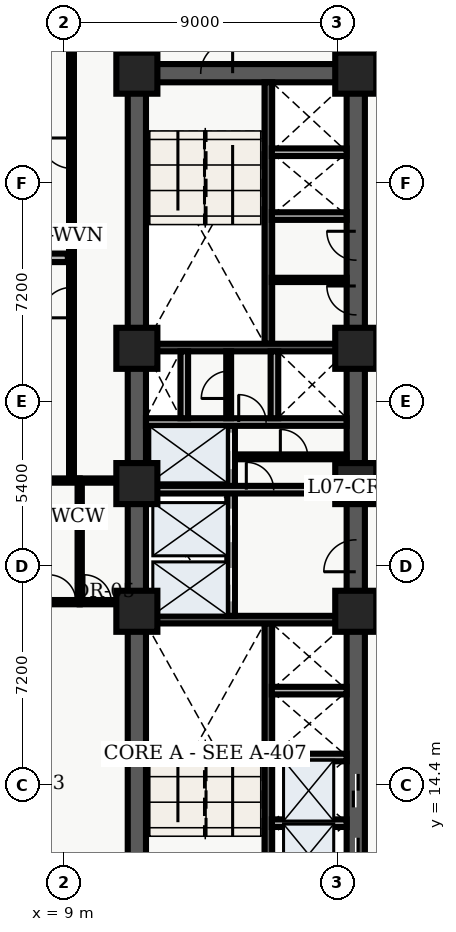
"""IFC4 building model, lengths in metres.
Left out: names, types, materials, properties, quantities, classifications, styles, units other than length and angle.
Written with IfcOpenShell. Run it as: python <this file> out.ifc"""

import sys

from ifc_helpers import new_model, entity, si_unit, converted_unit, direction, frame, origin_with_axes, origin_2d_with_axis, place, context, subcontext, project, spatial, polyline, rectangle, outline, extrude, element, fill, save


model = new_model("IFC4")
c1 = context("Model", 3, precision=1e-05, world=origin_with_axes(), true_north=direction((0.0, 1.0)))
c2 = subcontext(c1, "Body", "Model", "MODEL_VIEW")
j1 = project(units=[si_unit("LENGTHUNIT", "METRE"), converted_unit("PLANEANGLEUNIT", "DEGREE", entity("IfcPlaneAngleMeasure", 0.017), si_unit("PLANEANGLEUNIT", "RADIAN"), dimensions=[0, 0, 0, 0, 0, 0, 0])], contexts=[c1])
p1 = place(None, origin_with_axes())
s1 = spatial("IfcSite", under=j1, at=p1, CompositionType="ELEMENT")
p2 = place(p1, origin_with_axes())
s2 = spatial("IfcBuilding", under=s1, at=p2, CompositionType="ELEMENT")
p3 = place(p2, frame((0.0, 0.0, 32.7), z_axis=(0.0, 0.0, 1.0), x_axis=(1.0, 0.0, 0.0)))
s3 = spatial("IfcBuildingStorey", under=s2, at=p3, CompositionType="ELEMENT", Elevation=32.7)
p4 = place(p3, frame((11.4, 10.8, 0.0), z_axis=(0.0, 0.0, 1.0), x_axis=(0.0, 1.0, 0.0)))
e1 = element("IfcWall", 1, at=p4, inside=s3, PredefinedType="SHEAR", context=c2, shape_type="SweptSolid", body=[
    extrude(outline(polyline([(0.0, -0.3), (27.0, -0.3), (27.0, 0.3), (0.0, 0.3), (0.0, -0.3)])), origin_with_axes(), (0.0, 0.0, 1.0), 3.66),
])
p5 = place(p3, frame((11.4, 37.8, 0.0), z_axis=(0.0, 0.0, 1.0), x_axis=(1.0, 0.0, 0.0)))
e2 = element("IfcWall", 2, at=p5, inside=s3, PredefinedType="SHEAR", context=c2, shape_type="SweptSolid", body=[
    extrude(outline(polyline([(0.0, -0.3), (7.2, -0.3), (7.2, 0.3), (0.0, 0.3), (0.0, -0.3)])), origin_with_axes(), (0.0, 0.0, 1.0), 3.66),
])
p6 = place(p5, frame((2.625, 0.0, 0.0), z_axis=(0.0, 0.0, 1.0), x_axis=(1.0, 0.0, 0.0)))
e3 = element("IfcOpeningElement", 3, at=p6, cuts=e2, PredefinedType="OPENING", context=c2, shape_type="SweptSolid", body=[
    extrude(rectangle(XDim=1.05, YDim=0.62, at=origin_2d_with_axis()), origin_with_axes(), (0.0, 0.0, 1.0), 2.15),
])
p7 = place(p3, frame((18.6, 10.8, 0.0), z_axis=(0.0, 0.0, 1.0), x_axis=(0.0, 1.0, 0.0)))
e4 = element("IfcWall", 4, at=p7, inside=s3, PredefinedType="SHEAR", context=c2, shape_type="SweptSolid", body=[
    extrude(outline(polyline([(0.0, -0.3), (13.5, -0.3), (13.5, 0.3), (0.0, 0.3), (0.0, -0.3)])), origin_with_axes(), (0.0, 0.0, 1.0), 3.66),
])
p8 = place(p7, frame((1.3, 0.0, 0.0), z_axis=(0.0, 0.0, 1.0), x_axis=(1.0, 0.0, 0.0)))
e5 = element("IfcOpeningElement", 5, at=p8, cuts=e4, PredefinedType="OPENING", context=c2, shape_type="SweptSolid", body=[
    extrude(rectangle(XDim=1.1, YDim=0.62, at=origin_2d_with_axis()), origin_with_axes(), (0.0, 0.0, 1.0), 2.15),
])
p9 = place(p7, frame((3.4, 0.0, 0.0), z_axis=(0.0, 0.0, 1.0), x_axis=(1.0, 0.0, 0.0)))
e6 = element("IfcOpeningElement", 6, at=p9, cuts=e4, PredefinedType="OPENING", context=c2, shape_type="SweptSolid", body=[
    extrude(rectangle(XDim=1.1, YDim=0.62, at=origin_2d_with_axis()), origin_with_axes(), (0.0, 0.0, 1.0), 2.15),
])
p10 = place(p7, frame((11.125, 0.0, 0.0), z_axis=(0.0, 0.0, 1.0), x_axis=(1.0, 0.0, 0.0)))
e7 = element("IfcOpeningElement", 7, at=p10, cuts=e4, PredefinedType="OPENING", context=c2, shape_type="SweptSolid", body=[
    extrude(rectangle(XDim=1.05, YDim=0.62, at=origin_2d_with_axis()), origin_with_axes(), (0.0, 0.0, 1.0), 2.15),
])
p11 = place(p3, frame((18.6, 24.3, 0.0), z_axis=(0.0, 0.0, 1.0), x_axis=(0.0, 1.0, 0.0)))
e8 = element("IfcWall", 8, at=p11, inside=s3, PredefinedType="SHEAR", context=c2, shape_type="SweptSolid", body=[
    extrude(outline(polyline([(0.0, -0.3), (13.5, -0.3), (13.5, 0.3), (0.0, 0.3), (0.0, -0.3)])), origin_with_axes(), (0.0, 0.0, 1.0), 3.66),
])
p12 = place(p11, frame((6.025, 0.0, 0.0), z_axis=(0.0, 0.0, 1.0), x_axis=(1.0, 0.0, 0.0)))
e9 = element("IfcOpeningElement", 9, at=p12, cuts=e8, PredefinedType="OPENING", context=c2, shape_type="SweptSolid", body=[
    extrude(rectangle(XDim=0.95, YDim=0.62, at=origin_2d_with_axis()), origin_with_axes(), (0.0, 0.0, 1.0), 2.15),
])
p13 = place(p11, frame((7.825, 0.0, 0.0), z_axis=(0.0, 0.0, 1.0), x_axis=(1.0, 0.0, 0.0)))
e10 = element("IfcOpeningElement", 10, at=p13, cuts=e8, PredefinedType="OPENING", context=c2, shape_type="SweptSolid", body=[
    extrude(rectangle(XDim=0.95, YDim=0.62, at=origin_2d_with_axis()), origin_with_axes(), (0.0, 0.0, 1.0), 2.15),
])
p14 = place(p3, frame((15.725, 11.1, 0.0), z_axis=(0.0, 0.0, 1.0), x_axis=(0.0, 1.0, 0.0)))
e11 = element("IfcWall", 11, at=p14, inside=s3, PredefinedType="SHEAR", context=c2, shape_type="SweptSolid", body=[
    extrude(outline(polyline([(0.0, -0.125), (8.6, -0.125), (8.6, 0.125), (0.0, 0.125), (0.0, -0.125)])), origin_with_axes(), (0.0, 0.0, 1.0), 3.66),
])
p15 = place(p3, frame((11.7, 19.825, 0.0), z_axis=(0.0, 0.0, 1.0), x_axis=(1.0, 0.0, 0.0)))
e12 = element("IfcWall", 12, at=p15, inside=s3, PredefinedType="SHEAR", context=c2, shape_type="SweptSolid", body=[
    extrude(outline(polyline([(0.0, -0.125), (6.6, -0.125), (6.6, 0.125), (0.0, 0.125), (0.0, -0.125)])), origin_with_axes(), (0.0, 0.0, 1.0), 3.66),
])
p16 = place(p3, frame((15.725, 28.9, 0.0), z_axis=(0.0, 0.0, 1.0), x_axis=(0.0, 1.0, 0.0)))
e13 = element("IfcWall", 13, at=p16, inside=s3, PredefinedType="SHEAR", context=c2, shape_type="SweptSolid", body=[
    extrude(outline(polyline([(0.0, -0.125), (8.6, -0.125), (8.6, 0.125), (0.0, 0.125), (0.0, -0.125)])), origin_with_axes(), (0.0, 0.0, 1.0), 3.66),
])
p17 = place(p3, frame((11.7, 28.775, 0.0), z_axis=(0.0, 0.0, 1.0), x_axis=(1.0, 0.0, 0.0)))
e14 = element("IfcWall", 14, at=p17, inside=s3, PredefinedType="SHEAR", context=c2, shape_type="SweptSolid", body=[
    extrude(outline(polyline([(0.0, -0.125), (6.6, -0.125), (6.6, 0.125), (0.0, 0.125), (0.0, -0.125)])), origin_with_axes(), (0.0, 0.0, 1.0), 3.66),
])
p18 = place(p3, frame((14.5, 19.95, 0.0), z_axis=(0.0, 0.0, 1.0), x_axis=(0.0, 1.0, 0.0)))
e15 = element("IfcWall", 15, at=p18, inside=s3, PredefinedType="SOLIDWALL", context=c2, shape_type="SweptSolid", body=[
    extrude(outline(polyline([(0.0, -0.125), (6.25, -0.125), (6.25, 0.125), (0.0, 0.125), (0.0, -0.125)])), origin_with_axes(), (0.0, 0.0, 1.0), 2.7),
])
p19 = place(p18, frame((1.025, 0.0, 0.0), z_axis=(0.0, 0.0, 1.0), x_axis=(1.0, 0.0, 0.0)))
e16 = element("IfcOpeningElement", 16, at=p19, cuts=e15, PredefinedType="OPENING", context=c2, shape_type="SweptSolid", body=[
    extrude(rectangle(XDim=1.1, YDim=0.27, at=origin_2d_with_axis()), origin_with_axes(), (0.0, 0.0, 1.0), 2.15),
])
p20 = place(p18, frame((2.975, 0.0, 0.0), z_axis=(0.0, 0.0, 1.0), x_axis=(1.0, 0.0, 0.0)))
e17 = element("IfcOpeningElement", 17, at=p20, cuts=e15, PredefinedType="OPENING", context=c2, shape_type="SweptSolid", body=[
    extrude(rectangle(XDim=1.1, YDim=0.27, at=origin_2d_with_axis()), origin_with_axes(), (0.0, 0.0, 1.0), 2.15),
])
p21 = place(p18, frame((5.425, 0.0, 0.0), z_axis=(0.0, 0.0, 1.0), x_axis=(1.0, 0.0, 0.0)))
e18 = element("IfcOpeningElement", 18, at=p21, cuts=e15, PredefinedType="OPENING", context=c2, shape_type="SweptSolid", body=[
    extrude(rectangle(XDim=1.2, YDim=0.27, at=origin_2d_with_axis()), origin_with_axes(), (0.0, 0.0, 1.0), 2.15),
])
p22 = place(p3, frame((11.7, 24.1, 0.0), z_axis=(0.0, 0.0, 1.0), x_axis=(1.0, 0.0, 0.0)))
e19 = element("IfcWall", 19, at=p22, inside=s3, PredefinedType="SOLIDWALL", context=c2, shape_type="SweptSolid", body=[
    extrude(outline(polyline([(0.0, -0.125), (6.6, -0.125), (6.6, 0.125), (0.0, 0.125), (0.0, -0.125)])), origin_with_axes(), (0.0, 0.0, 1.0), 2.7),
])
p23 = place(p22, frame((3.75, 0.0, 0.0), z_axis=(0.0, 0.0, 1.0), x_axis=(1.0, 0.0, 0.0)))
e20 = element("IfcOpeningElement", 20, at=p23, cuts=e19, PredefinedType="OPENING", context=c2, shape_type="SweptSolid", body=[
    extrude(rectangle(XDim=0.9, YDim=0.27, at=origin_2d_with_axis()), origin_with_axes(), (0.0, 0.0, 1.0), 2.15),
])
p24 = place(p3, frame((11.7, 26.325, 0.0), z_axis=(0.0, 0.0, 1.0), x_axis=(1.0, 0.0, 0.0)))
e21 = element("IfcWall", 21, at=p24, inside=s3, PredefinedType="SOLIDWALL", context=c2, shape_type="SweptSolid", body=[
    extrude(outline(polyline([(0.0, -0.125), (6.6, -0.125), (6.6, 0.125), (0.0, 0.125), (0.0, -0.125)])), origin_with_axes(), (0.0, 0.0, 1.0), 2.7),
])
p25 = place(p24, frame((3.5, 0.0, 0.0), z_axis=(0.0, 0.0, 1.0), x_axis=(1.0, 0.0, 0.0)))
e22 = element("IfcOpeningElement", 22, at=p25, cuts=e21, PredefinedType="OPENING", context=c2, shape_type="SweptSolid", body=[
    extrude(rectangle(XDim=0.9, YDim=0.27, at=origin_2d_with_axis()), origin_with_axes(), (0.0, 0.0, 1.0), 2.15),
])
for number, where, z_axis, x_axis in (
    (23, (12.96, 26.45, 0.0), (0.0, 0.0, 1.0), (0.0, 1.0, 0.0)),
    (24, (15.925, 26.45, 0.0), (0.0, 0.0, 1.0), (0.0, 1.0, 0.0)),
):
    element("IfcWall", number, at=place(p3, frame(where, z_axis=z_axis, x_axis=x_axis)), inside=s3, PredefinedType="SOLIDWALL", context=c2, shape_type="SweptSolid", body=[
        extrude(outline(polyline([(0.0, -0.125), (2.2, -0.125), (2.2, 0.125), (0.0, 0.125), (0.0, -0.125)])), origin_with_axes(), (0.0, 0.0, 1.0), 2.7),
    ])
for number, where, z_axis, x_axis in (
    (25, (11.4, 20.1, 0.0), (0.0, 0.0, 1.0), (1.0, 0.0, 0.0)),
    (26, (11.4, 24.3, 0.0), (0.0, 0.0, 1.0), (1.0, 0.0, 0.0)),
    (27, (11.4, 28.75, 0.0), (0.0, 0.0, 1.0), (1.0, 0.0, 0.0)),
    (28, (11.4, 37.8, 0.0), (0.0, 0.0, 1.0), (1.0, 0.0, 0.0)),
    (29, (18.6, 20.1, 0.0), (0.0, 0.0, 1.0), (1.0, 0.0, 0.0)),
    (30, (18.6, 24.3, 0.0), (0.0, 0.0, 1.0), (1.0, 0.0, 0.0)),
    (31, (18.6, 28.75, 0.0), (0.0, 0.0, 1.0), (1.0, 0.0, 0.0)),
    (32, (18.6, 37.8, 0.0), (0.0, 0.0, 1.0), (1.0, 0.0, 0.0)),
):
    element("IfcColumn", number, at=place(p3, frame(where, z_axis=z_axis, x_axis=x_axis)), inside=s3, PredefinedType="COLUMN", context=c2, shape_type="SweptSolid", body=[
        extrude(rectangle(XDim=1.35, YDim=1.35, at=origin_2d_with_axis()), origin_with_axes(), (0.0, 0.0, 1.0), 3.9),
    ])
p26 = place(p3, frame((14.62, 25.18, 0.0), z_axis=(0.0, 0.0, 1.0), x_axis=(1.0, 0.0, 0.0)))
e33 = element("IfcWall", 33, at=p26, inside=s3, PredefinedType="PARTITIONING", context=c2, shape_type="SweptSolid", body=[
    extrude(outline(polyline([(0.0, -0.08), (3.68, -0.08), (3.68, 0.08), (0.0, 0.08), (0.0, -0.08)])), origin_with_axes(), (0.0, 0.0, 1.0), 2.7),
])
p27 = place(p26, frame((1.95, 0.0, 0.0), z_axis=(0.0, 0.0, 1.0), x_axis=(1.0, 0.0, 0.0)))
e34 = element("IfcOpeningElement", 34, at=p27, cuts=e33, PredefinedType="OPENING", context=c2, shape_type="SweptSolid", body=[
    extrude(rectangle(XDim=0.9, YDim=0.18, at=origin_2d_with_axis()), origin_with_axes(), (0.0, 0.0, 1.0), 2.15),
])
p28 = place(p3, frame((14.42, 26.45, 0.0), z_axis=(0.0, 0.0, 1.0), x_axis=(0.0, 1.0, 0.0)))
e35 = element("IfcWall", 35, at=p28, inside=s3, PredefinedType="PARTITIONING", context=c2, shape_type="SweptSolid", body=[
    extrude(outline(polyline([(0.0, -0.08), (2.2, -0.08), (2.2, 0.08), (0.0, 0.08), (0.0, -0.08)])), origin_with_axes(), (0.0, 0.0, 1.0), 2.7),
])
p29 = place(p28, frame((1.1, 0.0, 0.0), z_axis=(0.0, 0.0, 1.0), x_axis=(1.0, 0.0, 0.0)))
e36 = element("IfcOpeningElement", 36, at=p29, cuts=e35, PredefinedType="OPENING", context=c2, shape_type="SweptSolid", body=[
    extrude(rectangle(XDim=0.9, YDim=0.18, at=origin_2d_with_axis()), origin_with_axes(), (0.0, 0.0, 1.0), 2.15),
])
for number, where, z_axis, x_axis in (
    (37, (15.84, 13.13, 0.0), (0.0, 0.0, 1.0), (1.0, 0.0, 0.0)),
    (38, (15.84, 15.29, 0.0), (0.0, 0.0, 1.0), (1.0, 0.0, 0.0)),
    (39, (15.84, 17.49, 0.0), (0.0, 0.0, 1.0), (1.0, 0.0, 0.0)),
    (40, (15.84, 33.1, 0.0), (0.0, 0.0, 1.0), (1.0, 0.0, 0.0)),
    (41, (15.84, 35.2, 0.0), (0.0, 0.0, 1.0), (1.0, 0.0, 0.0)),
):
    element("IfcWall", number, at=place(p3, frame(where, z_axis=z_axis, x_axis=x_axis)), inside=s3, PredefinedType="SOLIDWALL", context=c2, shape_type="SweptSolid", body=[
        extrude(outline(polyline([(0.0, -0.125), (2.46, -0.125), (2.46, 0.125), (0.0, 0.125), (0.0, -0.125)])), origin_with_axes(), (0.0, 0.0, 1.0), 2.7),
    ])
p30 = place(p3, frame((15.84, 31.0, 0.0), z_axis=(0.0, 0.0, 1.0), x_axis=(1.0, 0.0, 0.0)))
e42 = element("IfcWall", 42, at=p30, inside=s3, PredefinedType="PARTITIONING", context=c2, shape_type="SweptSolid", body=[
    extrude(outline(polyline([(0.0, -0.07), (2.46, -0.07), (2.46, 0.07), (0.0, 0.07), (0.0, -0.07)])), origin_with_axes(), (0.0, 0.0, 1.0), 2.7),
])
p31 = place(p3, frame((9.52, 20.4, 0.0), z_axis=(0.0, 0.0, 1.0), x_axis=(0.0, 1.0, 0.0)))
e43 = element("IfcWall", 43, at=p31, inside=s3, PredefinedType="PARTITIONING", context=c2, shape_type="SweptSolid", body=[
    extrude(outline(polyline([(0.0, -0.07), (4.0, -0.07), (4.0, 0.07), (0.0, 0.07), (0.0, -0.07)])), origin_with_axes(), (0.0, 0.0, 1.0), 2.7),
])
p32 = place(p3, frame((9.52, 20.4, 0.0), z_axis=(0.0, 0.0, 1.0), x_axis=(1.0, 0.0, 0.0)))
e44 = element("IfcWall", 44, at=p32, inside=s3, PredefinedType="PARTITIONING", context=c2, shape_type="SweptSolid", body=[
    extrude(outline(polyline([(0.0, -0.07), (1.58, -0.07), (1.58, 0.07), (0.0, 0.07), (0.0, -0.07)])), origin_with_axes(), (0.0, 0.0, 1.0), 2.7),
])
p33 = place(p32, frame((0.59, 0.0, 0.0), z_axis=(0.0, 0.0, 1.0), x_axis=(1.0, 0.0, 0.0)))
e45 = element("IfcOpeningElement", 45, at=p33, cuts=e44, PredefinedType="OPENING", context=c2, shape_type="SweptSolid", body=[
    extrude(rectangle(XDim=0.9, YDim=0.16, at=origin_2d_with_axis()), origin_with_axes(), (0.0, 0.0, 1.0), 2.15),
])
p34 = place(p3, frame((9.52, 24.4, 0.0), z_axis=(0.0, 0.0, 1.0), x_axis=(1.0, 0.0, 0.0)))
e46 = element("IfcWall", 46, at=p34, inside=s3, PredefinedType="PARTITIONING", context=c2, shape_type="SweptSolid", body=[
    extrude(outline(polyline([(0.0, -0.07), (1.58, -0.07), (1.58, 0.07), (0.0, 0.07), (0.0, -0.07)])), origin_with_axes(), (0.0, 0.0, 1.0), 2.7),
])
p35 = place(p3, frame((9.25, 24.4, 0.0), z_axis=(0.0, 0.0, 1.0), x_axis=(0.0, 1.0, 0.0)))
e47 = element("IfcWall", 47, at=p35, inside=s3, PredefinedType="PARTITIONING", context=c2, shape_type="SweptSolid", body=[
    extrude(outline(polyline([(0.0, -0.08), (16.1, -0.08), (16.1, 0.08), (0.0, 0.08), (0.0, -0.08)])), origin_with_axes(), (0.0, 0.0, 1.0), 2.7),
])
p36 = place(p35, frame((5.853, 0.0, 0.0), z_axis=(0.0, 0.0, 1.0), x_axis=(1.0, 0.0, 0.0)))
e48 = element("IfcOpeningElement", 48, at=p36, cuts=e47, PredefinedType="OPENING", context=c2, shape_type="SweptSolid", body=[
    extrude(rectangle(XDim=1.0, YDim=0.18, at=origin_2d_with_axis()), origin_with_axes(), (0.0, 0.0, 1.0), 2.15),
])
p37 = place(p35, frame((10.768, 0.0, 0.0), z_axis=(0.0, 0.0, 1.0), x_axis=(1.0, 0.0, 0.0)))
e49 = element("IfcOpeningElement", 49, at=p37, cuts=e47, PredefinedType="OPENING", context=c2, shape_type="SweptSolid", body=[
    extrude(rectangle(XDim=1.0, YDim=0.18, at=origin_2d_with_axis()), origin_with_axes(), (0.0, 0.0, 1.0), 2.15),
])
p38 = place(p3, frame((0.36, 20.4, 0.0), z_axis=(0.0, 0.0, 1.0), x_axis=(1.0, 0.0, 0.0)))
e50 = element("IfcWall", 50, at=p38, inside=s3, PredefinedType="PARTITIONING", context=c2, shape_type="SweptSolid", body=[
    extrude(outline(polyline([(0.0, -0.07), (9.16, -0.07), (9.16, 0.07), (0.0, 0.07), (0.0, -0.07)])), origin_with_axes(), (0.0, 0.0, 1.0), 2.7),
])
p39 = place(p38, frame((8.59, 0.0, 0.0), z_axis=(0.0, 0.0, 1.0), x_axis=(1.0, 0.0, 0.0)))
e51 = element("IfcOpeningElement", 51, at=p39, cuts=e50, PredefinedType="OPENING", context=c2, shape_type="SweptSolid", body=[
    extrude(rectangle(XDim=0.9, YDim=0.16, at=origin_2d_with_axis()), origin_with_axes(), (0.0, 0.0, 1.0), 2.15),
])
p40 = place(p3, frame((0.36, 24.4, 0.0), z_axis=(0.0, 0.0, 1.0), x_axis=(1.0, 0.0, 0.0)))
e52 = element("IfcWall", 52, at=p40, inside=s3, PredefinedType="PARTITIONING", context=c2, shape_type="SweptSolid", body=[
    extrude(outline(polyline([(0.0, -0.07), (9.16, -0.07), (9.16, 0.07), (0.0, 0.07), (0.0, -0.07)])), origin_with_axes(), (0.0, 0.0, 1.0), 2.7),
])
p41 = place(p3, frame((0.375, 31.726, 0.0), z_axis=(0.0, 0.0, 1.0), x_axis=(1.0, 0.0, 0.0)))
e53 = element("IfcWall", 53, at=p41, inside=s3, PredefinedType="PARTITIONING", context=c2, shape_type="SweptSolid", body=[
    extrude(outline(polyline([(0.0, -0.14), (8.755, -0.14), (8.755, 0.14), (0.0, 0.14), (0.0, -0.14)])), origin_with_axes(), (0.0, 0.0, 1.0), 2.7),
])
p42 = place(p7, frame((1.3, 0.0, 0.0), z_axis=(0.0, 0.0, 1.0), x_axis=(1.0, 0.0, 0.0)))
e54 = element("IfcDoor", 54, at=p42, inside=s3, OperationType="SLIDING_TO_LEFT", PredefinedType="DOOR", context=c2, shape_type="SweptSolid", body=[
    extrude(rectangle(XDim=1.1, YDim=0.09, at=origin_2d_with_axis()), origin_with_axes(), (0.0, 0.0, 1.0), 2.15),
])
fill(e5, e54)
p43 = place(p7, frame((3.4, 0.0, 0.0), z_axis=(0.0, 0.0, 1.0), x_axis=(1.0, 0.0, 0.0)))
e55 = element("IfcDoor", 55, at=p43, inside=s3, OperationType="SLIDING_TO_RIGHT", PredefinedType="DOOR", context=c2, shape_type="SweptSolid", body=[
    extrude(rectangle(XDim=1.1, YDim=0.09, at=origin_2d_with_axis()), origin_with_axes(), (0.0, 0.0, 1.0), 2.15),
])
fill(e6, e55)
p44 = place(p18, frame((1.025, 0.0, 0.0), z_axis=(0.0, 0.0, 1.0), x_axis=(1.0, 0.0, 0.0)))
e56 = element("IfcDoor", 56, at=p44, inside=s3, OperationType="SLIDING_TO_LEFT", PredefinedType="DOOR", context=c2, shape_type="SweptSolid", body=[
    extrude(rectangle(XDim=1.1, YDim=0.09, at=origin_2d_with_axis()), origin_with_axes(), (0.0, 0.0, 1.0), 2.15),
])
fill(e16, e56)
p45 = place(p18, frame((2.975, 0.0, 0.0), z_axis=(0.0, 0.0, 1.0), x_axis=(1.0, 0.0, 0.0)))
e57 = element("IfcDoor", 57, at=p45, inside=s3, OperationType="SLIDING_TO_RIGHT", PredefinedType="DOOR", context=c2, shape_type="SweptSolid", body=[
    extrude(rectangle(XDim=1.1, YDim=0.09, at=origin_2d_with_axis()), origin_with_axes(), (0.0, 0.0, 1.0), 2.15),
])
fill(e17, e57)
p46 = place(p18, frame((5.425, 0.0, 0.0), z_axis=(0.0, 0.0, 1.0), x_axis=(1.0, 0.0, 0.0)))
e58 = element("IfcDoor", 58, at=p46, inside=s3, OperationType="DOUBLE_DOOR_SLIDING", PredefinedType="DOOR", context=c2, shape_type="SweptSolid", body=[
    extrude(rectangle(XDim=1.2, YDim=0.09, at=origin_2d_with_axis()), origin_with_axes(), (0.0, 0.0, 1.0), 2.15),
])
fill(e18, e58)
p47 = place(p5, frame((2.625, 0.0, 0.0), z_axis=(0.0, 0.0, 1.0), x_axis=(1.0, 0.0, 0.0)))
e59 = element("IfcDoor", 59, at=p47, inside=s3, OperationType="SINGLE_SWING_RIGHT", PredefinedType="DOOR", context=c2, shape_type="SweptSolid", body=[
    extrude(rectangle(XDim=1.05, YDim=0.09, at=origin_2d_with_axis()), origin_with_axes(), (0.0, 0.0, 1.0), 2.15),
])
fill(e3, e59)
p48 = place(p7, frame((11.125, 0.0, 0.0), z_axis=(0.0, 0.0, 1.0), x_axis=(1.0, 0.0, 0.0)))
e60 = element("IfcDoor", 60, at=p48, inside=s3, OperationType="SINGLE_SWING_LEFT", PredefinedType="DOOR", context=c2, shape_type="SweptSolid", body=[
    extrude(rectangle(XDim=1.05, YDim=0.09, at=origin_2d_with_axis()), origin_with_axes(), (0.0, 0.0, 1.0), 2.15),
])
fill(e7, e60)
p49 = place(p24, frame((3.5, 0.0, 0.0), z_axis=(0.0, 0.0, 1.0), x_axis=(1.0, 0.0, 0.0)))
e61 = element("IfcDoor", 61, at=p49, inside=s3, OperationType="SINGLE_SWING_LEFT", PredefinedType="DOOR", context=c2, shape_type="SweptSolid", body=[
    extrude(rectangle(XDim=0.9, YDim=0.09, at=origin_2d_with_axis()), origin_with_axes(), (0.0, 0.0, 1.0), 2.15),
])
fill(e22, e61)
p50 = place(p28, frame((1.1, 0.0, 0.0), z_axis=(0.0, 0.0, 1.0), x_axis=(1.0, 0.0, 0.0)))
e62 = element("IfcDoor", 62, at=p50, inside=s3, OperationType="SINGLE_SWING_LEFT", PredefinedType="DOOR", context=c2, shape_type="SweptSolid", body=[
    extrude(rectangle(XDim=0.9, YDim=0.09, at=origin_2d_with_axis()), origin_with_axes(), (0.0, 0.0, 1.0), 2.15),
])
fill(e36, e62)
p51 = place(p22, frame((3.75, 0.0, 0.0), z_axis=(0.0, 0.0, 1.0), x_axis=(1.0, 0.0, 0.0)))
e63 = element("IfcDoor", 63, at=p51, inside=s3, OperationType="SINGLE_SWING_LEFT", PredefinedType="DOOR", context=c2, shape_type="SweptSolid", body=[
    extrude(rectangle(XDim=0.9, YDim=0.09, at=origin_2d_with_axis()), origin_with_axes(), (0.0, 0.0, 1.0), 2.15),
])
fill(e20, e63)
p52 = place(p26, frame((1.95, 0.0, 0.0), z_axis=(0.0, 0.0, 1.0), x_axis=(1.0, 0.0, 0.0)))
e64 = element("IfcDoor", 64, at=p52, inside=s3, OperationType="SINGLE_SWING_LEFT", PredefinedType="DOOR", context=c2, shape_type="SweptSolid", body=[
    extrude(rectangle(XDim=0.9, YDim=0.09, at=origin_2d_with_axis()), origin_with_axes(), (0.0, 0.0, 1.0), 2.15),
])
fill(e34, e64)
p53 = place(p11, frame((6.025, 0.0, 0.0), z_axis=(0.0, 0.0, 1.0), x_axis=(1.0, 0.0, 0.0)))
e65 = element("IfcDoor", 65, at=p53, inside=s3, OperationType="SINGLE_SWING_RIGHT", PredefinedType="DOOR", context=c2, shape_type="SweptSolid", body=[
    extrude(rectangle(XDim=0.95, YDim=0.09, at=origin_2d_with_axis()), origin_with_axes(), (0.0, 0.0, 1.0), 2.15),
])
fill(e9, e65)
p54 = place(p11, frame((7.825, 0.0, 0.0), z_axis=(0.0, 0.0, 1.0), x_axis=(1.0, 0.0, 0.0)))
e66 = element("IfcDoor", 66, at=p54, inside=s3, OperationType="SINGLE_SWING_RIGHT", PredefinedType="DOOR", context=c2, shape_type="SweptSolid", body=[
    extrude(rectangle(XDim=0.95, YDim=0.09, at=origin_2d_with_axis()), origin_with_axes(), (0.0, 0.0, 1.0), 2.15),
])
fill(e10, e66)
p55 = place(p32, frame((0.59, 0.0, 0.0), z_axis=(0.0, 0.0, 1.0), x_axis=(1.0, 0.0, 0.0)))
e67 = element("IfcDoor", 67, at=p55, inside=s3, OperationType="SINGLE_SWING_LEFT", PredefinedType="DOOR", context=c2, shape_type="SweptSolid", body=[
    extrude(rectangle(XDim=0.9, YDim=0.084, at=origin_2d_with_axis()), origin_with_axes(), (0.0, 0.0, 1.0), 2.15),
])
fill(e45, e67)
p56 = place(p38, frame((8.59, 0.0, 0.0), z_axis=(0.0, 0.0, 1.0), x_axis=(1.0, 0.0, 0.0)))
e68 = element("IfcDoor", 68, at=p56, inside=s3, OperationType="SINGLE_SWING_LEFT", PredefinedType="DOOR", context=c2, shape_type="SweptSolid", body=[
    extrude(rectangle(XDim=0.9, YDim=0.084, at=origin_2d_with_axis()), origin_with_axes(), (0.0, 0.0, 1.0), 2.15),
])
fill(e51, e68)
p57 = place(p35, frame((5.853, 0.0, 0.0), z_axis=(0.0, 0.0, 1.0), x_axis=(1.0, 0.0, 0.0)))
e69 = element("IfcDoor", 69, at=p57, inside=s3, OperationType="SINGLE_SWING_LEFT", PredefinedType="DOOR", context=c2, shape_type="SweptSolid", body=[
    extrude(rectangle(XDim=1.0, YDim=0.09, at=origin_2d_with_axis()), origin_with_axes(), (0.0, 0.0, 1.0), 2.15),
])
fill(e48, e69)
p58 = place(p35, frame((10.768, 0.0, 0.0), z_axis=(0.0, 0.0, 1.0), x_axis=(1.0, 0.0, 0.0)))
e70 = element("IfcDoor", 70, at=p58, inside=s3, OperationType="SINGLE_SWING_RIGHT", PredefinedType="DOOR", context=c2, shape_type="SweptSolid", body=[
    extrude(rectangle(XDim=1.0, YDim=0.09, at=origin_2d_with_axis()), origin_with_axes(), (0.0, 0.0, 1.0), 2.15),
])
fill(e49, e70)
save(model, sys.argv[1])
